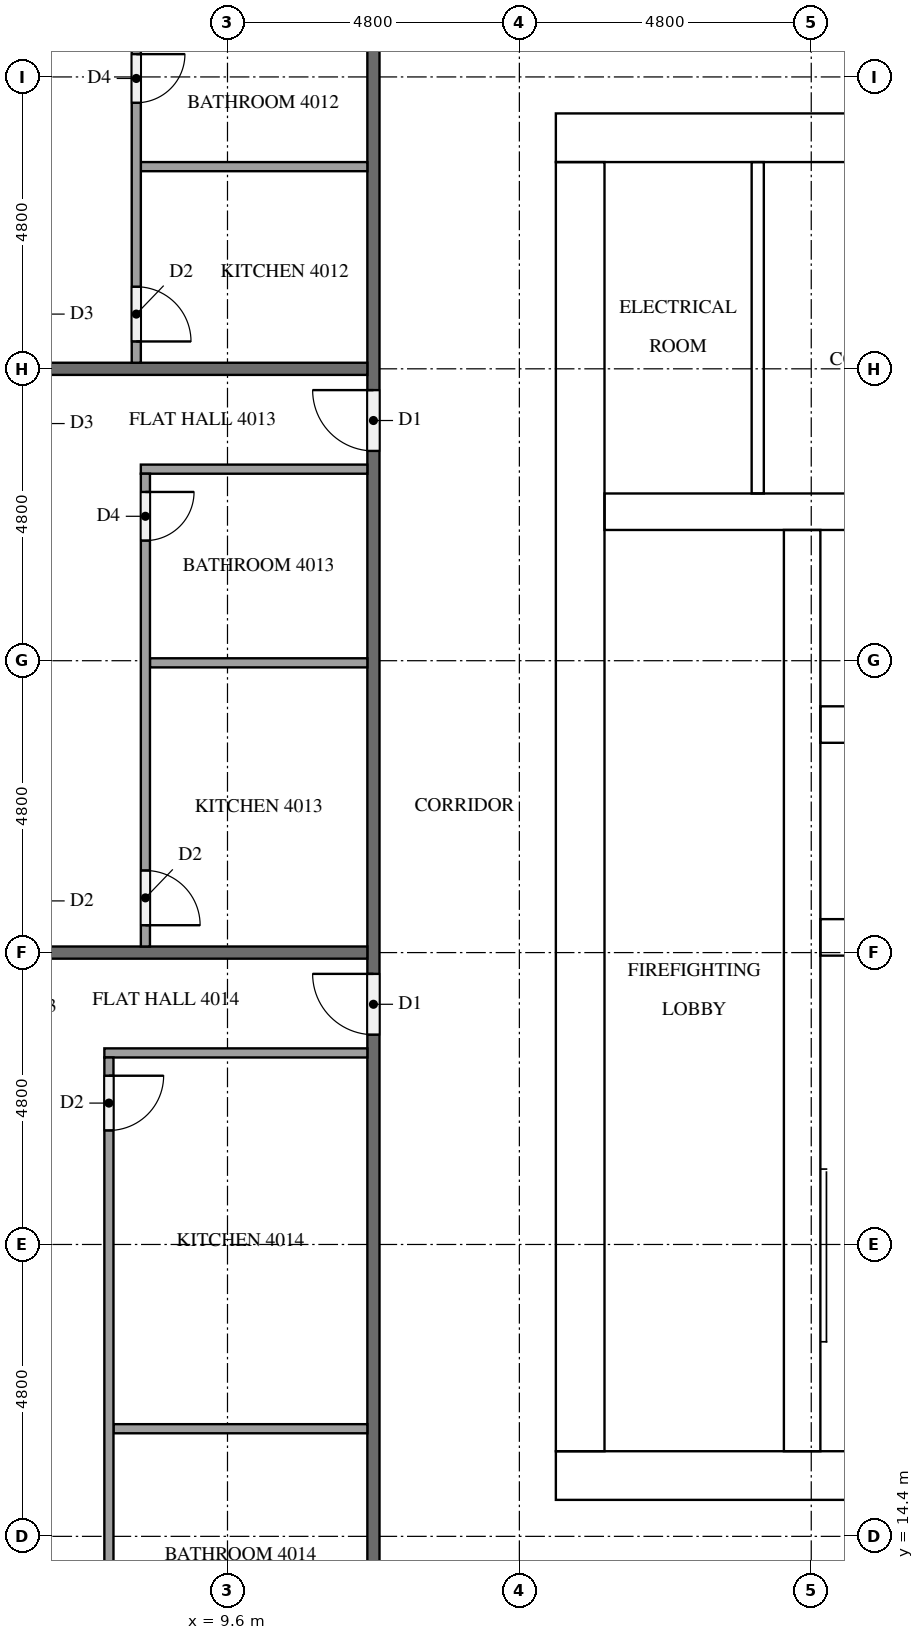
"""IFC4 building model, lengths in metres.
Left out: names, types, materials, properties, quantities, classifications, styles, units other than length and angle.
Written with IfcOpenShell. Run it as: python <this file> out.ifc"""

import sys

from ifc_helpers import new_model, si_unit, direction, frame, frame_2d, origin, place, context, subcontext, project, spatial, rectangle, extrude, element, fill, save


model = new_model("IFC4")
c1 = context("Model", 3, precision=1e-05, world=origin(), true_north=direction((0.0, 1.0)))
c2 = subcontext(c1, "Body", "Model", "MODEL_VIEW")
j1 = project(units=[si_unit("LENGTHUNIT", "METRE"), si_unit("PLANEANGLEUNIT", "RADIAN")], contexts=[c1])
p1 = place(None, origin())
s1 = spatial("IfcSite", under=j1, at=p1, CompositionType="ELEMENT")
p2 = place(p1, origin())
s2 = spatial("IfcBuilding", under=s1, at=p2, CompositionType="ELEMENT")
p3 = place(p2, frame((0.0, 0.0, 156.0)))
s3 = spatial("IfcBuildingStorey", under=s2, at=p3, CompositionType="ELEMENT", Elevation=156.0)
p4 = place(p3, frame((15.0, 15.4, 0.0), z_axis=(0.0, 0.0, 1.0), x_axis=(1.0, 0.0, 0.0)))
e1 = element("IfcWall", 1, at=p4, inside=s3, PredefinedType="SHEAR", context=c2, shape_type="SweptSolid", body=[
    extrude(rectangle(XDim=32.4, YDim=0.8, at=frame_2d((16.2, 0.0))), origin(), (0.0, 0.0, 1.0), 3.2),
])
p5 = place(p4, frame((15.3, 0.0, 0.0)))
e2 = element("IfcOpeningElement", 2, at=p5, cuts=e1, PredefinedType="OPENING", context=c2, shape_type="SweptSolid", body=[
    extrude(rectangle(XDim=1.8, YDim=2.1, at=frame_2d((0.9, 1.05))), frame((0.0, 0.41, 0.0), z_axis=(0.0, -1.0, 0.0), x_axis=(1.0, 0.0, 0.0)), (0.0, 0.0, 1.0), 0.82),
])
p6 = place(p3, frame((15.0, 37.4, 0.0), z_axis=(0.0, 0.0, 1.0), x_axis=(1.0, 0.0, 0.0)))
e3 = element("IfcWall", 3, at=p6, inside=s3, PredefinedType="SHEAR", context=c2, shape_type="SweptSolid", body=[
    extrude(rectangle(XDim=32.4, YDim=0.8, at=frame_2d((16.2, 0.0))), origin(), (0.0, 0.0, 1.0), 3.2),
])
p7 = place(p6, frame((15.3, 0.0, 0.0)))
e4 = element("IfcOpeningElement", 4, at=p7, cuts=e3, PredefinedType="OPENING", context=c2, shape_type="SweptSolid", body=[
    extrude(rectangle(XDim=1.8, YDim=2.1, at=frame_2d((0.9, 1.05))), frame((0.0, 0.41, 0.0), z_axis=(0.0, -1.0, 0.0), x_axis=(1.0, 0.0, 0.0)), (0.0, 0.0, 1.0), 0.82),
])
p8 = place(p6, frame((1.51, 0.0, 0.0)))
e5 = element("IfcOpeningElement", 5, at=p8, cuts=e3, PredefinedType="OPENING", context=c2, shape_type="SweptSolid", body=[
    extrude(rectangle(XDim=1.0, YDim=2.1, at=frame_2d((0.5, 1.05))), frame((0.0, 0.41, 0.0), z_axis=(0.0, -1.0, 0.0), x_axis=(1.0, 0.0, 0.0)), (0.0, 0.0, 1.0), 0.82),
])
p9 = place(p6, frame((5.11, 0.0, 0.0)))
e6 = element("IfcOpeningElement", 6, at=p9, cuts=e3, PredefinedType="OPENING", context=c2, shape_type="SweptSolid", body=[
    extrude(rectangle(XDim=1.0, YDim=2.1, at=frame_2d((0.5, 1.05))), frame((0.0, 0.41, 0.0), z_axis=(0.0, -1.0, 0.0), x_axis=(1.0, 0.0, 0.0)), (0.0, 0.0, 1.0), 0.82),
])
p10 = place(p3, frame((15.4, 15.8, 0.0), z_axis=(0.0, 0.0, 1.0), x_axis=(0.0, 1.0, 0.0)))
e7 = element("IfcWall", 7, at=p10, inside=s3, PredefinedType="SHEAR", context=c2, shape_type="SweptSolid", body=[
    extrude(rectangle(XDim=21.2, YDim=0.8, at=frame_2d((10.6, 0.0))), origin(), (0.0, 0.0, 1.0), 3.2),
])
p11 = place(p10, frame((4.96, 0.0, 0.0)))
e8 = element("IfcOpeningElement", 8, at=p11, cuts=e7, PredefinedType="OPENING", context=c2, shape_type="SweptSolid", body=[
    extrude(rectangle(XDim=1.2, YDim=2.1, at=frame_2d((0.6, 1.05))), frame((0.0, 0.41, 0.0), z_axis=(0.0, -1.0, 0.0), x_axis=(1.0, 0.0, 0.0)), (0.0, 0.0, 1.0), 0.82),
])
p12 = place(p3, frame((19.05, 15.8, 0.0), z_axis=(0.0, 0.0, 1.0), x_axis=(0.0, 1.0, 0.0)))
e9 = element("IfcWall", 9, at=p12, inside=s3, PredefinedType="SHEAR", context=c2, shape_type="SweptSolid", body=[
    extrude(rectangle(XDim=15.15, YDim=0.6, at=frame_2d((7.575, 0.0))), origin(), (0.0, 0.0, 1.0), 3.2),
])
p13 = place(p12, frame((9.65, 0.0, 0.0)))
e10 = element("IfcOpeningElement", 10, at=p13, cuts=e9, PredefinedType="OPENING", context=c2, shape_type="SweptSolid", body=[
    extrude(rectangle(XDim=1.1, YDim=2.1, at=frame_2d((0.55, 1.05))), frame((0.0, 0.31, 0.0), z_axis=(0.0, -1.0, 0.0), x_axis=(1.0, 0.0, 0.0)), (0.0, 0.0, 1.0), 0.62),
])
p14 = place(p12, frame((13.15, 0.0, 0.0)))
e11 = element("IfcOpeningElement", 11, at=p14, cuts=e9, PredefinedType="OPENING", context=c2, shape_type="SweptSolid", body=[
    extrude(rectangle(XDim=1.1, YDim=2.1, at=frame_2d((0.55, 1.05))), frame((0.0, 0.31, 0.0), z_axis=(0.0, -1.0, 0.0), x_axis=(1.0, 0.0, 0.0)), (0.0, 0.0, 1.0), 0.62),
])
p15 = place(p12, frame((0.4, 0.0, 0.0)))
e12 = element("IfcOpeningElement", 12, at=p15, cuts=e9, PredefinedType="OPENING", context=c2, shape_type="SweptSolid", body=[
    extrude(rectangle(XDim=1.2, YDim=2.1, at=frame_2d((0.6, 1.05))), frame((0.0, 0.31, 0.0), z_axis=(0.0, -1.0, 0.0), x_axis=(1.0, 0.0, 0.0)), (0.0, 0.0, 1.0), 0.62),
])
for number, where, z_axis, x_axis in (
    (13, (19.35, 24.25, 0.0), (0.0, 0.0, 1.0), (1.0, 0.0, 0.0)),
    (14, (19.35, 27.75, 0.0), (0.0, 0.0, 1.0), (1.0, 0.0, 0.0)),
):
    element("IfcWall", number, at=place(p3, frame(where, z_axis=z_axis, x_axis=x_axis)), inside=s3, PredefinedType="SHEAR", context=c2, shape_type="SweptSolid", body=[
        extrude(rectangle(XDim=3.45, YDim=0.6, at=frame_2d((1.725, 0.0))), origin(), (0.0, 0.0, 1.0), 3.2),
    ])
p16 = place(p3, frame((15.8, 31.25, 0.0), z_axis=(0.0, 0.0, 1.0), x_axis=(1.0, 0.0, 0.0)))
e15 = element("IfcWall", 15, at=p16, inside=s3, PredefinedType="SHEAR", context=c2, shape_type="SweptSolid", body=[
    extrude(rectangle(XDim=7.0, YDim=0.6, at=frame_2d((3.5, 0.0))), origin(), (0.0, 0.0, 1.0), 3.2),
])
p17 = place(p3, frame((18.32, 31.55, 0.0), z_axis=(0.0, 0.0, 1.0), x_axis=(0.0, 1.0, 0.0)))
e16 = element("IfcWall", 16, at=p17, inside=s3, PredefinedType="PARTITIONING", context=c2, shape_type="SweptSolid", body=[
    extrude(rectangle(XDim=5.45, YDim=0.2, at=frame_2d((2.725, 0.0))), origin(), (0.0, 0.0, 1.0), 3.2),
])
p18 = place(p3, frame((12.0, 12.1, 0.0), z_axis=(0.0, 0.0, 1.0), x_axis=(0.0, 1.0, 0.0)))
e17 = element("IfcWall", 17, at=p18, inside=s3, PredefinedType="PARTITIONING", context=c2, shape_type="SweptSolid", body=[
    extrude(rectangle(XDim=28.6, YDim=0.2, at=frame_2d((14.3, 0.0))), origin(), (0.0, 0.0, 1.0), 3.2),
])
p19 = place(p18, frame((27.35, 0.0, 0.0)))
e18 = element("IfcOpeningElement", 18, at=p19, cuts=e17, PredefinedType="OPENING", context=c2, shape_type="SweptSolid", body=[
    extrude(rectangle(XDim=1.0, YDim=2.1, at=frame_2d((0.5, 1.05))), frame((0.0, 0.11, 0.0), z_axis=(0.0, -1.0, 0.0), x_axis=(1.0, 0.0, 0.0)), (0.0, 0.0, 1.0), 0.22),
])
p20 = place(p18, frame((20.15, 0.0, 0.0)))
e19 = element("IfcOpeningElement", 19, at=p20, cuts=e17, PredefinedType="OPENING", context=c2, shape_type="SweptSolid", body=[
    extrude(rectangle(XDim=1.0, YDim=2.1, at=frame_2d((0.5, 1.05))), frame((0.0, 0.11, 0.0), z_axis=(0.0, -1.0, 0.0), x_axis=(1.0, 0.0, 0.0)), (0.0, 0.0, 1.0), 0.22),
])
p21 = place(p18, frame((10.55, 0.0, 0.0)))
e20 = element("IfcOpeningElement", 20, at=p21, cuts=e17, PredefinedType="OPENING", context=c2, shape_type="SweptSolid", body=[
    extrude(rectangle(XDim=1.0, YDim=2.1, at=frame_2d((0.5, 1.05))), frame((0.0, 0.11, 0.0), z_axis=(0.0, -1.0, 0.0), x_axis=(1.0, 0.0, 0.0)), (0.0, 0.0, 1.0), 0.22),
])
for number, where, z_axis, x_axis in (
    (21, (0.375, 33.6, 0.0), (0.0, 0.0, 1.0), (1.0, 0.0, 0.0)),
    (22, (0.375, 24.0, 0.0), (0.0, 0.0, 1.0), (1.0, 0.0, 0.0)),
):
    element("IfcWall", number, at=place(p3, frame(where, z_axis=z_axis, x_axis=x_axis)), inside=s3, PredefinedType="PARTITIONING", context=c2, shape_type="SweptSolid", body=[
        extrude(rectangle(XDim=11.525, YDim=0.2, at=frame_2d((5.762, 0.0))), origin(), (0.0, 0.0, 1.0), 3.2),
    ])
p22 = place(p3, frame((11.9, 36.925, 0.0), z_axis=(0.0, 0.0, 1.0), x_axis=(-1.0, 0.0, 0.0)))
e23 = element("IfcWall", 23, at=p22, inside=s3, PredefinedType="PARTITIONING", context=c2, shape_type="SweptSolid", body=[
    extrude(rectangle(XDim=3.725, YDim=0.15, at=frame_2d((1.862, 0.0))), origin(), (0.0, 0.0, 1.0), 3.2),
])
p23 = place(p3, frame((8.1, 39.075, 0.0), z_axis=(0.0, 0.0, 1.0), x_axis=(0.0, -1.0, 0.0)))
e24 = element("IfcWall", 24, at=p23, inside=s3, PredefinedType="PARTITIONING", context=c2, shape_type="SweptSolid", body=[
    extrude(rectangle(XDim=5.375, YDim=0.15, at=frame_2d((2.688, 0.0))), origin(), (0.0, 0.0, 1.0), 3.2),
])
p24 = place(p23, frame((0.3, 0.0, 0.0)))
e25 = element("IfcOpeningElement", 25, at=p24, cuts=e24, PredefinedType="OPENING", context=c2, shape_type="SweptSolid", body=[
    extrude(rectangle(XDim=0.8, YDim=2.1, at=frame_2d((0.4, 1.05))), frame((0.0, 0.085, 0.0), z_axis=(0.0, -1.0, 0.0), x_axis=(1.0, 0.0, 0.0)), (0.0, 0.0, 1.0), 0.17),
])
p25 = place(p23, frame((4.125, 0.0, 0.0)))
e26 = element("IfcOpeningElement", 26, at=p25, cuts=e24, PredefinedType="OPENING", context=c2, shape_type="SweptSolid", body=[
    extrude(rectangle(XDim=0.9, YDim=2.1, at=frame_2d((0.45, 1.05))), frame((0.0, 0.085, 0.0), z_axis=(0.0, -1.0, 0.0), x_axis=(1.0, 0.0, 0.0)), (0.0, 0.0, 1.0), 0.17),
])
p26 = place(p3, frame((11.9, 28.765, 0.0), z_axis=(0.0, 0.0, 1.0), x_axis=(-1.0, 0.0, 0.0)))
e27 = element("IfcWall", 27, at=p26, inside=s3, PredefinedType="PARTITIONING", context=c2, shape_type="SweptSolid", body=[
    extrude(rectangle(XDim=3.575, YDim=0.15, at=frame_2d((1.788, 0.0))), origin(), (0.0, 0.0, 1.0), 3.2),
])
p27 = place(p3, frame((11.9, 31.95, 0.0), z_axis=(0.0, 0.0, 1.0), x_axis=(-1.0, 0.0, 0.0)))
e28 = element("IfcWall", 28, at=p27, inside=s3, PredefinedType="PARTITIONING", context=c2, shape_type="SweptSolid", body=[
    extrude(rectangle(XDim=3.725, YDim=0.15, at=frame_2d((1.862, 0.0))), origin(), (0.0, 0.0, 1.0), 3.2),
])
p28 = place(p3, frame((8.25, 31.875, 0.0), z_axis=(0.0, 0.0, 1.0), x_axis=(0.0, -1.0, 0.0)))
e29 = element("IfcWall", 29, at=p28, inside=s3, PredefinedType="PARTITIONING", context=c2, shape_type="SweptSolid", body=[
    extrude(rectangle(XDim=7.775, YDim=0.15, at=frame_2d((3.887, 0.0))), origin(), (0.0, 0.0, 1.0), 3.2),
])
p29 = place(p28, frame((0.3, 0.0, 0.0)))
e30 = element("IfcOpeningElement", 30, at=p29, cuts=e29, PredefinedType="OPENING", context=c2, shape_type="SweptSolid", body=[
    extrude(rectangle(XDim=0.8, YDim=2.1, at=frame_2d((0.4, 1.05))), frame((0.0, 0.085, 0.0), z_axis=(0.0, -1.0, 0.0), x_axis=(1.0, 0.0, 0.0)), (0.0, 0.0, 1.0), 0.17),
])
p30 = place(p28, frame((6.525, 0.0, 0.0)))
e31 = element("IfcOpeningElement", 31, at=p30, cuts=e29, PredefinedType="OPENING", context=c2, shape_type="SweptSolid", body=[
    extrude(rectangle(XDim=0.9, YDim=2.1, at=frame_2d((0.45, 1.05))), frame((0.0, 0.085, 0.0), z_axis=(0.0, -1.0, 0.0), x_axis=(1.0, 0.0, 0.0)), (0.0, 0.0, 1.0), 0.17),
])
p31 = place(p3, frame((11.9, 16.17, 0.0), z_axis=(0.0, 0.0, 1.0), x_axis=(-1.0, 0.0, 0.0)))
e32 = element("IfcWall", 32, at=p31, inside=s3, PredefinedType="PARTITIONING", context=c2, shape_type="SweptSolid", body=[
    extrude(rectangle(XDim=4.175, YDim=0.15, at=frame_2d((2.087, 0.0))), origin(), (0.0, 0.0, 1.0), 3.2),
])
p32 = place(p3, frame((11.9, 22.35, 0.0), z_axis=(0.0, 0.0, 1.0), x_axis=(-1.0, 0.0, 0.0)))
e33 = element("IfcWall", 33, at=p32, inside=s3, PredefinedType="PARTITIONING", context=c2, shape_type="SweptSolid", body=[
    extrude(rectangle(XDim=4.325, YDim=0.15, at=frame_2d((2.163, 0.0))), origin(), (0.0, 0.0, 1.0), 3.2),
])
p33 = place(p3, frame((7.65, 22.275, 0.0), z_axis=(0.0, 0.0, 1.0), x_axis=(0.0, -1.0, 0.0)))
e34 = element("IfcWall", 34, at=p33, inside=s3, PredefinedType="PARTITIONING", context=c2, shape_type="SweptSolid", body=[
    extrude(rectangle(XDim=10.175, YDim=0.15, at=frame_2d((5.087, 0.0))), origin(), (0.0, 0.0, 1.0), 3.2),
])
p34 = place(p33, frame((0.3, 0.0, 0.0)))
e35 = element("IfcOpeningElement", 35, at=p34, cuts=e34, PredefinedType="OPENING", context=c2, shape_type="SweptSolid", body=[
    extrude(rectangle(XDim=0.9, YDim=2.1, at=frame_2d((0.45, 1.05))), frame((0.0, 0.085, 0.0), z_axis=(0.0, -1.0, 0.0), x_axis=(1.0, 0.0, 0.0)), (0.0, 0.0, 1.0), 0.17),
])
p35 = place(p33, frame((9.025, 0.0, 0.0)))
e36 = element("IfcOpeningElement", 36, at=p35, cuts=e34, PredefinedType="OPENING", context=c2, shape_type="SweptSolid", body=[
    extrude(rectangle(XDim=0.8, YDim=2.1, at=frame_2d((0.4, 1.05))), frame((0.0, 0.085, 0.0), z_axis=(0.0, -1.0, 0.0), x_axis=(1.0, 0.0, 0.0)), (0.0, 0.0, 1.0), 0.17),
])
p36 = place(p13, origin())
e37 = element("IfcDoor", 37, at=p36, inside=s3, OperationType="DOUBLE_DOOR_SLIDING", PredefinedType="DOOR", context=c2, shape_type="SweptSolid", body=[
    extrude(rectangle(XDim=1.1, YDim=2.1, at=frame_2d((0.55, 1.05))), frame((0.0, 0.025, 0.0), z_axis=(0.0, -1.0, 0.0), x_axis=(1.0, 0.0, 0.0)), (0.0, 0.0, 1.0), 0.05),
])
fill(e10, e37)
p37 = place(p14, origin())
e38 = element("IfcDoor", 38, at=p37, inside=s3, OperationType="DOUBLE_DOOR_SLIDING", PredefinedType="DOOR", context=c2, shape_type="SweptSolid", body=[
    extrude(rectangle(XDim=1.1, YDim=2.1, at=frame_2d((0.55, 1.05))), frame((0.0, 0.025, 0.0), z_axis=(0.0, -1.0, 0.0), x_axis=(1.0, 0.0, 0.0)), (0.0, 0.0, 1.0), 0.05),
])
fill(e11, e38)
p38 = place(p15, frame((1.2, 0.0, 0.0), z_axis=(0.0, 0.0, 1.0), x_axis=(-1.0, 0.0, 0.0)))
e39 = element("IfcDoor", 39, at=p38, inside=s3, OperationType="SINGLE_SWING_RIGHT", PredefinedType="DOOR", context=c2, shape_type="SweptSolid", body=[
    extrude(rectangle(XDim=1.2, YDim=2.1, at=frame_2d((0.6, 1.05))), frame((0.0, 0.025, 0.0), z_axis=(0.0, -1.0, 0.0), x_axis=(1.0, 0.0, 0.0)), (0.0, 0.0, 1.0), 0.05),
])
fill(e12, e39)
p39 = place(p11, frame((1.2, 0.0, 0.0), z_axis=(0.0, 0.0, 1.0), x_axis=(-1.0, 0.0, 0.0)))
e40 = element("IfcDoor", 40, at=p39, inside=s3, OperationType="SINGLE_SWING_LEFT", PredefinedType="DOOR", context=c2, shape_type="SweptSolid", body=[
    extrude(rectangle(XDim=1.2, YDim=2.1, at=frame_2d((0.6, 1.05))), frame((0.0, 0.025, 0.0), z_axis=(0.0, -1.0, 0.0), x_axis=(1.0, 0.0, 0.0)), (0.0, 0.0, 1.0), 0.05),
])
fill(e8, e40)
p40 = place(p8, origin())
e41 = element("IfcDoor", 41, at=p40, inside=s3, OperationType="SINGLE_SWING_LEFT", PredefinedType="DOOR", context=c2, shape_type="SweptSolid", body=[
    extrude(rectangle(XDim=1.0, YDim=2.1, at=frame_2d((0.5, 1.05))), frame((0.0, 0.025, 0.0), z_axis=(0.0, -1.0, 0.0), x_axis=(1.0, 0.0, 0.0)), (0.0, 0.0, 1.0), 0.05),
])
fill(e5, e41)
p41 = place(p20, origin())
e42 = element("IfcDoor", 42, at=p41, inside=s3, OperationType="SINGLE_SWING_RIGHT", PredefinedType="DOOR", context=c2, shape_type="SweptSolid", body=[
    extrude(rectangle(XDim=1.0, YDim=2.1, at=frame_2d((0.5, 1.05))), frame((0.0, 0.025, 0.0), z_axis=(0.0, -1.0, 0.0), x_axis=(1.0, 0.0, 0.0)), (0.0, 0.0, 1.0), 0.05),
])
fill(e19, e42)
p42 = place(p21, origin())
e43 = element("IfcDoor", 43, at=p42, inside=s3, OperationType="SINGLE_SWING_RIGHT", PredefinedType="DOOR", context=c2, shape_type="SweptSolid", body=[
    extrude(rectangle(XDim=1.0, YDim=2.1, at=frame_2d((0.5, 1.05))), frame((0.0, 0.025, 0.0), z_axis=(0.0, -1.0, 0.0), x_axis=(1.0, 0.0, 0.0)), (0.0, 0.0, 1.0), 0.05),
])
fill(e20, e43)
p43 = place(p24, origin())
e44 = element("IfcDoor", 44, at=p43, inside=s3, OperationType="SINGLE_SWING_LEFT", PredefinedType="DOOR", context=c2, shape_type="SweptSolid", body=[
    extrude(rectangle(XDim=0.8, YDim=2.1, at=frame_2d((0.4, 1.05))), frame((0.0, 0.025, 0.0), z_axis=(0.0, -1.0, 0.0), x_axis=(1.0, 0.0, 0.0)), (0.0, 0.0, 1.0), 0.05),
])
fill(e25, e44)
p44 = place(p25, origin())
e45 = element("IfcDoor", 45, at=p44, inside=s3, OperationType="SINGLE_SWING_RIGHT", PredefinedType="DOOR", context=c2, shape_type="SweptSolid", body=[
    extrude(rectangle(XDim=0.9, YDim=2.1, at=frame_2d((0.45, 1.05))), frame((0.0, 0.025, 0.0), z_axis=(0.0, -1.0, 0.0), x_axis=(1.0, 0.0, 0.0)), (0.0, 0.0, 1.0), 0.05),
])
fill(e26, e45)
p45 = place(p29, origin())
e46 = element("IfcDoor", 46, at=p45, inside=s3, OperationType="SINGLE_SWING_LEFT", PredefinedType="DOOR", context=c2, shape_type="SweptSolid", body=[
    extrude(rectangle(XDim=0.8, YDim=2.1, at=frame_2d((0.4, 1.05))), frame((0.0, 0.025, 0.0), z_axis=(0.0, -1.0, 0.0), x_axis=(1.0, 0.0, 0.0)), (0.0, 0.0, 1.0), 0.05),
])
fill(e30, e46)
p46 = place(p30, origin())
e47 = element("IfcDoor", 47, at=p46, inside=s3, OperationType="SINGLE_SWING_RIGHT", PredefinedType="DOOR", context=c2, shape_type="SweptSolid", body=[
    extrude(rectangle(XDim=0.9, YDim=2.1, at=frame_2d((0.45, 1.05))), frame((0.0, 0.025, 0.0), z_axis=(0.0, -1.0, 0.0), x_axis=(1.0, 0.0, 0.0)), (0.0, 0.0, 1.0), 0.05),
])
fill(e31, e47)
p47 = place(p34, origin())
e48 = element("IfcDoor", 48, at=p47, inside=s3, OperationType="SINGLE_SWING_LEFT", PredefinedType="DOOR", context=c2, shape_type="SweptSolid", body=[
    extrude(rectangle(XDim=0.9, YDim=2.1, at=frame_2d((0.45, 1.05))), frame((0.0, 0.025, 0.0), z_axis=(0.0, -1.0, 0.0), x_axis=(1.0, 0.0, 0.0)), (0.0, 0.0, 1.0), 0.05),
])
fill(e35, e48)
save(model, sys.argv[1])
